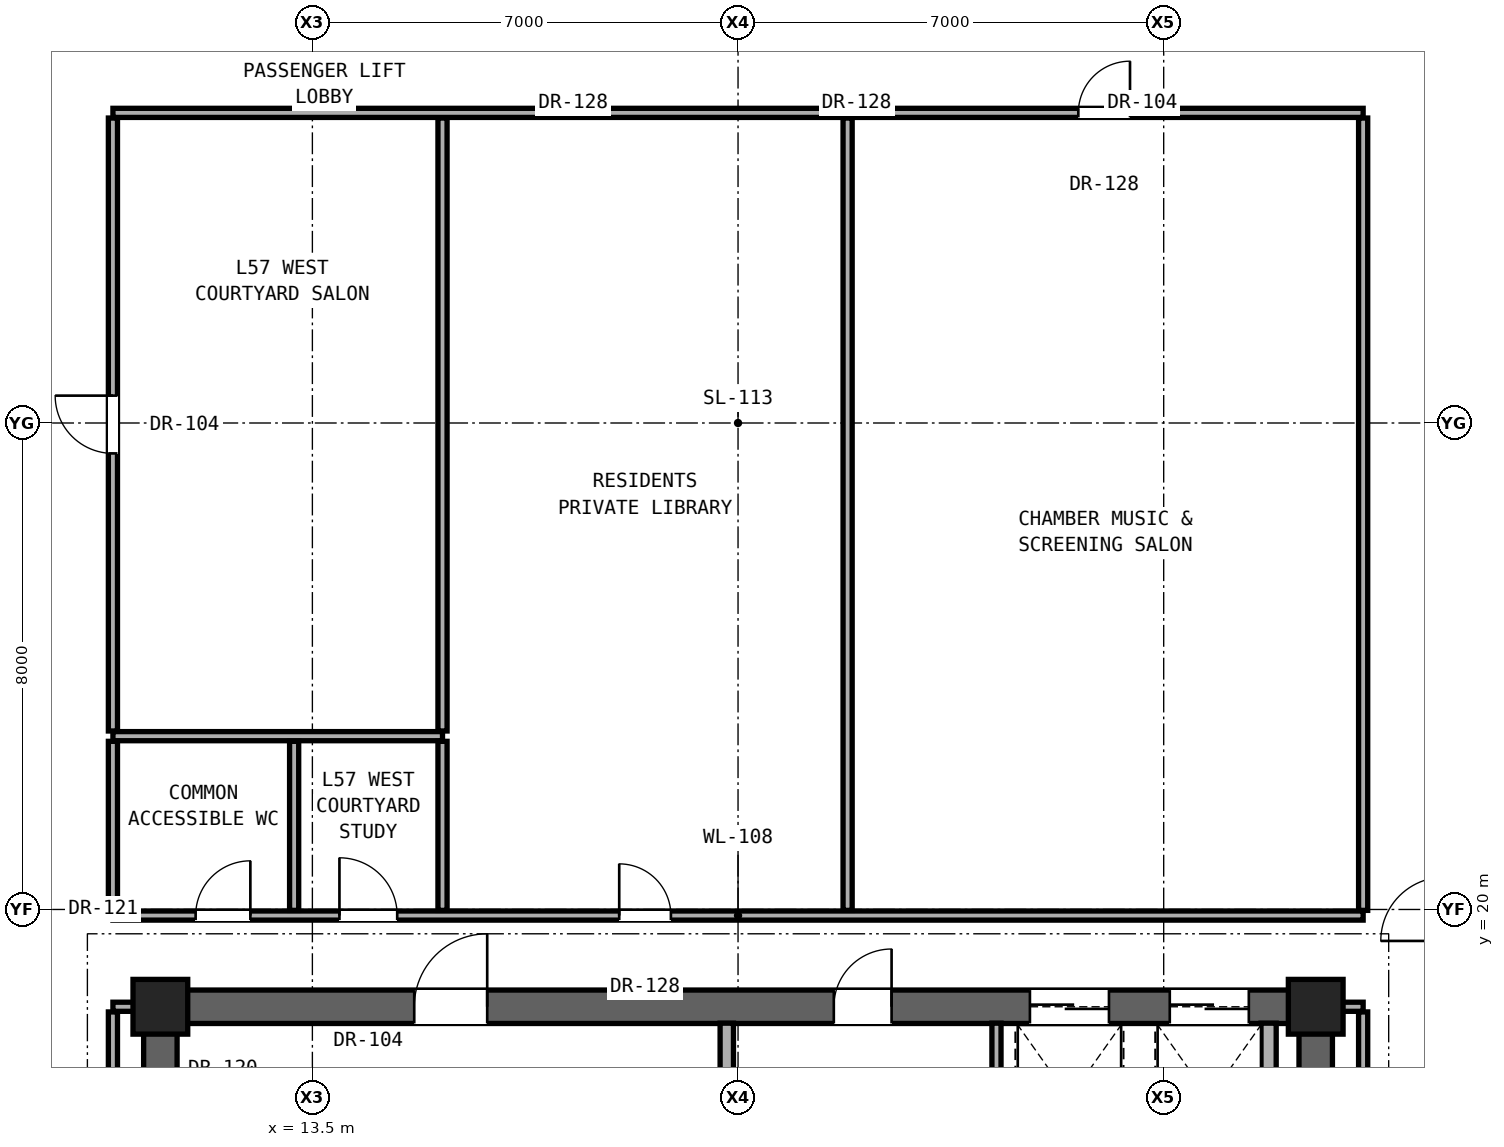
"""IFC4 building model, lengths in metres.
Left out: names, types, materials, properties, quantities, classifications, styles, units other than length and angle.
Written with IfcOpenShell. Run it as: python <this file> out.ifc"""

import sys

from ifc_helpers import new_model, si_unit, direction, frame, frame_2d, origin, origin_2d, place, context, subcontext, project, spatial, rectangle, extrude, element, fill, save


model = new_model("IFC4")
c1 = context("Model", 3, precision=1e-05, world=origin(), true_north=direction((0.0, 1.0)))
c2 = subcontext(c1, "Body", "Model", "MODEL_VIEW")
j1 = project(units=[si_unit("LENGTHUNIT", "METRE"), si_unit("PLANEANGLEUNIT", "RADIAN")], contexts=[c1])
p1 = place(None, origin())
s1 = spatial("IfcSite", under=j1, at=p1, CompositionType="ELEMENT")
p2 = place(p1, origin())
s2 = spatial("IfcBuilding", under=s1, at=p2, CompositionType="ELEMENT")
p3 = place(p2, frame((0.0, 0.0, 199.9)))
s3 = spatial("IfcBuildingStorey", under=s2, at=p3, CompositionType="ELEMENT", Elevation=199.9)
for number, where, z_axis, x_axis in (
    (1, (11.0, 18.4, 0.0), (0.0, 0.0, 1.0), (1.0, 0.0, 0.0)),
    (2, (30.0, 18.4, 0.0), (0.0, 0.0, 1.0), (1.0, 0.0, 0.0)),
):
    element("IfcColumn", number, at=place(p3, frame(where, z_axis=z_axis, x_axis=x_axis)), inside=s3, PredefinedType="COLUMN", context=c2, shape_type="SweptSolid", body=[
        extrude(rectangle(XDim=0.9, YDim=0.9, at=origin_2d()), origin(), (0.0, 0.0, 1.0), 3.25),
    ])
for number, where, z_axis, x_axis in (
    (3, (11.0, 12.4, 0.0), (0.0, 0.0, 1.0), (0.0, 1.0, 0.0)),
    (4, (30.0, 12.4, 0.0), (0.0, 0.0, 1.0), (0.0, 1.0, 0.0)),
):
    element("IfcWall", number, at=place(p3, frame(where, z_axis=z_axis, x_axis=x_axis)), inside=s3, PredefinedType="SHEAR", context=c2, shape_type="SweptSolid", body=[
        extrude(rectangle(XDim=6.0, YDim=0.55, at=frame_2d((3.0, 0.0))), origin(), (0.0, 0.0, 1.0), 3.05),
    ])
p4 = place(p3, frame((11.0, 18.4, 0.0), z_axis=(0.0, 0.0, 1.0), x_axis=(1.0, 0.0, 0.0)))
e5 = element("IfcWall", 5, at=p4, inside=s3, PredefinedType="SHEAR", context=c2, shape_type="SweptSolid", body=[
    extrude(rectangle(XDim=19.0, YDim=0.55, at=frame_2d((9.5, 0.0))), origin(), (0.0, 0.0, 1.0), 3.05),
])
p5 = place(p4, frame((4.175, 0.0, 0.0)))
e6 = element("IfcOpeningElement", 6, at=p5, cuts=e5, PredefinedType="OPENING", context=c2, shape_type="SweptSolid", body=[
    extrude(rectangle(XDim=1.2, YDim=2.25, at=frame_2d((0.6, 1.125))), frame((0.0, 0.285, 0.0), z_axis=(0.0, -1.0, 0.0), x_axis=(1.0, 0.0, 0.0)), (0.0, 0.0, 1.0), 0.57),
])
p6 = place(p4, frame((11.075, 0.0, 0.0)))
e7 = element("IfcOpeningElement", 7, at=p6, cuts=e5, PredefinedType="OPENING", context=c2, shape_type="SweptSolid", body=[
    extrude(rectangle(XDim=0.95, YDim=2.15, at=frame_2d((0.475, 1.075))), frame((0.0, 0.285, 0.0), z_axis=(0.0, -1.0, 0.0), x_axis=(1.0, 0.0, 0.0)), (0.0, 0.0, 1.0), 0.57),
])
p7 = place(p4, frame((14.3, 0.0, 0.0)))
e8 = element("IfcOpeningElement", 8, at=p7, cuts=e5, PredefinedType="OPENING", context=c2, shape_type="SweptSolid", body=[
    extrude(rectangle(XDim=1.3, YDim=2.3, at=frame_2d((0.65, 1.15))), frame((0.0, 0.285, 0.0), z_axis=(0.0, -1.0, 0.0), x_axis=(1.0, 0.0, 0.0)), (0.0, 0.0, 1.0), 0.57),
])
p8 = place(p4, frame((16.6, 0.0, 0.0)))
e9 = element("IfcOpeningElement", 9, at=p8, cuts=e5, PredefinedType="OPENING", context=c2, shape_type="SweptSolid", body=[
    extrude(rectangle(XDim=1.3, YDim=2.3, at=frame_2d((0.65, 1.15))), frame((0.0, 0.285, 0.0), z_axis=(0.0, -1.0, 0.0), x_axis=(1.0, 0.0, 0.0)), (0.0, 0.0, 1.0), 0.57),
])
for number, where, z_axis, x_axis in (
    (10, (10.22, 18.4, 0.0), (0.0, 0.0, 1.0), (1.0, 0.0, 0.0)),
    (11, (30.27, 18.4, 0.0), (0.0, 0.0, 1.0), (1.0, 0.0, 0.0)),
):
    element("IfcWall", number, at=place(p3, frame(where, z_axis=z_axis, x_axis=x_axis)), inside=s3, PredefinedType="PARTITIONING", context=c2, shape_type="SweptSolid", body=[
        extrude(rectangle(XDim=0.51, YDim=0.15, at=frame_2d((0.255, 0.0))), origin(), (0.0, 0.0, 1.0), 2.442),
    ])
p9 = place(p3, frame((10.22, 19.9, 0.0), z_axis=(0.0, 0.0, 1.0), x_axis=(1.0, 0.0, 0.0)))
e12 = element("IfcWall", 12, at=p9, inside=s3, PredefinedType="PARTITIONING", context=c2, shape_type="SweptSolid", body=[
    extrude(rectangle(XDim=20.56, YDim=0.15, at=frame_2d((10.28, 0.0))), origin(), (0.0, 0.0, 1.0), 2.186),
])
p10 = place(p9, frame((1.36, 0.0, 0.0)))
e13 = element("IfcOpeningElement", 13, at=p10, cuts=e12, PredefinedType="OPENING", context=c2, shape_type="SweptSolid", body=[
    extrude(rectangle(XDim=0.9, YDim=2.1, at=frame_2d((0.45, 1.05))), frame((0.0, 0.085, 0.0), z_axis=(0.0, -1.0, 0.0), x_axis=(1.0, 0.0, 0.0)), (0.0, 0.0, 1.0), 0.17),
])
p11 = place(p9, frame((3.725, 0.0, 0.0)))
e14 = element("IfcOpeningElement", 14, at=p11, cuts=e12, PredefinedType="OPENING", context=c2, shape_type="SweptSolid", body=[
    extrude(rectangle(XDim=0.95, YDim=2.15, at=frame_2d((0.475, 1.075))), frame((0.0, 0.085, 0.0), z_axis=(0.0, -1.0, 0.0), x_axis=(1.0, 0.0, 0.0)), (0.0, 0.0, 1.0), 0.17),
])
p12 = place(p9, frame((8.326, 0.0, 0.0)))
e15 = element("IfcOpeningElement", 15, at=p12, cuts=e12, PredefinedType="OPENING", context=c2, shape_type="SweptSolid", body=[
    extrude(rectangle(XDim=0.85, YDim=2.01, at=frame_2d((0.425, 1.005))), frame((0.0, 0.085, 0.0), z_axis=(0.0, -1.0, 0.0), x_axis=(1.0, 0.0, 0.0)), (0.0, 0.0, 1.0), 0.17),
])
p13 = place(p3, frame((10.22, 22.85, 0.0), z_axis=(0.0, 0.0, 1.0), x_axis=(1.0, 0.0, 0.0)))
e16 = element("IfcWall", 16, at=p13, inside=s3, PredefinedType="PARTITIONING", context=c2, shape_type="SweptSolid", body=[
    extrude(rectangle(XDim=5.42, YDim=0.15, at=frame_2d((2.71, 0.0))), origin(), (0.0, 0.0, 1.0), 2.186),
])
p14 = place(p3, frame((10.22, 33.1, 0.0), z_axis=(0.0, 0.0, 1.0), x_axis=(1.0, 0.0, 0.0)))
e17 = element("IfcWall", 17, at=p14, inside=s3, PredefinedType="PARTITIONING", context=c2, shape_type="SweptSolid", body=[
    extrude(rectangle(XDim=20.56, YDim=0.15, at=frame_2d((10.28, 0.0))), origin(), (0.0, 0.0, 1.0), 2.186),
])
p15 = place(p14, frame((15.876, 0.0, 0.0)))
e18 = element("IfcOpeningElement", 18, at=p15, cuts=e17, PredefinedType="OPENING", context=c2, shape_type="SweptSolid", body=[
    extrude(rectangle(XDim=0.85, YDim=2.01, at=frame_2d((0.425, 1.005))), frame((0.0, 0.085, 0.0), z_axis=(0.0, -1.0, 0.0), x_axis=(1.0, 0.0, 0.0)), (0.0, 0.0, 1.0), 0.17),
])
p16 = place(p3, frame((10.22, 12.335, 0.0), z_axis=(0.0, 0.0, 1.0), x_axis=(0.0, 1.0, 0.0)))
e19 = element("IfcWall", 19, at=p16, inside=s3, PredefinedType="PARTITIONING", context=c2, shape_type="SweptSolid", body=[
    extrude(rectangle(XDim=5.98, YDim=0.15, at=frame_2d((2.99, 0.0))), origin(), (0.0, 0.0, 1.0), 2.442),
])
p17 = place(p3, frame((10.22, 19.985, 0.0), z_axis=(0.0, 0.0, 1.0), x_axis=(0.0, 1.0, 0.0)))
e20 = element("IfcWall", 20, at=p17, inside=s3, PredefinedType="PARTITIONING", context=c2, shape_type="SweptSolid", body=[
    extrude(rectangle(XDim=2.78, YDim=0.15, at=frame_2d((1.39, 0.0))), origin(), (0.0, 0.0, 1.0), 3.05),
])
p18 = place(p3, frame((10.22, 22.935, 0.0), z_axis=(0.0, 0.0, 1.0), x_axis=(0.0, 1.0, 0.0)))
e21 = element("IfcWall", 21, at=p18, inside=s3, PredefinedType="PARTITIONING", context=c2, shape_type="SweptSolid", body=[
    extrude(rectangle(XDim=10.08, YDim=0.15, at=frame_2d((5.04, 0.0))), origin(), (0.0, 0.0, 1.0), 2.346),
])
p19 = place(p18, frame((4.565, 0.0, 0.0)))
e22 = element("IfcOpeningElement", 22, at=p19, cuts=e21, PredefinedType="OPENING", context=c2, shape_type="SweptSolid", body=[
    extrude(rectangle(XDim=0.95, YDim=2.15, at=frame_2d((0.475, 1.075))), frame((0.0, 0.085, 0.0), z_axis=(0.0, -1.0, 0.0), x_axis=(1.0, 0.0, 0.0)), (0.0, 0.0, 1.0), 0.17),
])
p20 = place(p3, frame((13.2, 19.985, 0.0), z_axis=(0.0, 0.0, 1.0), x_axis=(0.0, 1.0, 0.0)))
e23 = element("IfcWall", 23, at=p20, inside=s3, PredefinedType="PARTITIONING", context=c2, shape_type="SweptSolid", body=[
    extrude(rectangle(XDim=2.78, YDim=0.15, at=frame_2d((1.39, 0.0))), origin(), (0.0, 0.0, 1.0), 3.05),
])
p21 = place(p3, frame((15.64, 19.985, 0.0), z_axis=(0.0, 0.0, 1.0), x_axis=(0.0, 1.0, 0.0)))
e24 = element("IfcWall", 24, at=p21, inside=s3, PredefinedType="PARTITIONING", context=c2, shape_type="SweptSolid", body=[
    extrude(rectangle(XDim=2.78, YDim=0.15, at=frame_2d((1.39, 0.0))), origin(), (0.0, 0.0, 1.0), 2.625),
])
p22 = place(p3, frame((15.64, 22.935, 0.0), z_axis=(0.0, 0.0, 1.0), x_axis=(0.0, 1.0, 0.0)))
e25 = element("IfcWall", 25, at=p22, inside=s3, PredefinedType="PARTITIONING", context=c2, shape_type="SweptSolid", body=[
    extrude(rectangle(XDim=10.08, YDim=0.15, at=frame_2d((5.04, 0.0))), origin(), (0.0, 0.0, 1.0), 2.186),
])
p23 = place(p3, frame((20.315, 16.555, 0.0), z_axis=(0.0, 0.0, 1.0), x_axis=(0.0, 1.0, 0.0)))
e26 = element("IfcWall", 26, at=p23, inside=s3, PredefinedType="SOLIDWALL", context=c2, shape_type="SweptSolid", body=[
    extrude(rectangle(XDim=1.575, YDim=0.22, at=frame_2d((0.788, 0.0))), origin(), (0.0, 0.0, 1.0), 3.05),
])
p24 = place(p3, frame((22.302, 19.985, 0.0), z_axis=(0.0, 0.0, 1.0), x_axis=(0.0, 1.0, 0.0)))
e27 = element("IfcWall", 27, at=p24, inside=s3, PredefinedType="PARTITIONING", context=c2, shape_type="SweptSolid", body=[
    extrude(rectangle(XDim=13.03, YDim=0.15, at=frame_2d((6.515, 0.0))), origin(), (0.0, 0.0, 1.0), 2.186),
])
p25 = place(p3, frame((24.75, 15.573, 0.0), z_axis=(0.0, 0.0, 1.0), x_axis=(0.0, 1.0, 0.0)))
e28 = element("IfcWall", 28, at=p25, inside=s3, PredefinedType="PARTITIONING", context=c2, shape_type="SweptSolid", body=[
    extrude(rectangle(XDim=2.557, YDim=0.15, at=frame_2d((1.279, 0.0))), origin(), (0.0, 0.0, 1.0), 3.05),
])
p26 = place(p3, frame((29.225, 15.573, 0.0), z_axis=(0.0, 0.0, 1.0), x_axis=(0.0, 1.0, 0.0)))
e29 = element("IfcWall", 29, at=p26, inside=s3, PredefinedType="SOLIDWALL", context=c2, shape_type="SweptSolid", body=[
    extrude(rectangle(XDim=2.557, YDim=0.25, at=frame_2d((1.279, 0.0))), origin(), (0.0, 0.0, 1.0), 3.05),
])
p27 = place(p3, frame((30.78, 12.335, 0.0), z_axis=(0.0, 0.0, 1.0), x_axis=(0.0, 1.0, 0.0)))
e30 = element("IfcWall", 30, at=p27, inside=s3, PredefinedType="PARTITIONING", context=c2, shape_type="SweptSolid", body=[
    extrude(rectangle(XDim=5.98, YDim=0.15, at=frame_2d((2.99, 0.0))), origin(), (0.0, 0.0, 1.0), 2.442),
])
p28 = place(p3, frame((30.78, 19.985, 0.0), z_axis=(0.0, 0.0, 1.0), x_axis=(0.0, 1.0, 0.0)))
e31 = element("IfcWall", 31, at=p28, inside=s3, PredefinedType="PARTITIONING", context=c2, shape_type="SweptSolid", body=[
    extrude(rectangle(XDim=13.03, YDim=0.15, at=frame_2d((6.515, 0.0))), origin(), (0.0, 0.0, 1.0), 2.346),
])
p29 = place(p5, origin())
e32 = element("IfcDoor", 32, at=p29, inside=s3, OperationType="SINGLE_SWING_RIGHT", PredefinedType="DOOR", context=c2, shape_type="SweptSolid", body=[
    extrude(rectangle(XDim=1.2, YDim=2.25, at=frame_2d((0.6, 1.125))), frame((0.0, 0.025, 0.0), z_axis=(0.0, -1.0, 0.0), x_axis=(1.0, 0.0, 0.0)), (0.0, 0.0, 1.0), 0.05),
])
fill(e6, e32)
p30 = place(p6, origin())
e33 = element("IfcDoor", 33, at=p30, inside=s3, OperationType="SINGLE_SWING_RIGHT", PredefinedType="DOOR", context=c2, shape_type="SweptSolid", body=[
    extrude(rectangle(XDim=0.95, YDim=2.15, at=frame_2d((0.475, 1.075))), frame((0.0, 0.025, 0.0), z_axis=(0.0, -1.0, 0.0), x_axis=(1.0, 0.0, 0.0)), (0.0, 0.0, 1.0), 0.05),
])
fill(e7, e33)
p31 = place(p10, origin())
e34 = element("IfcDoor", 34, at=p31, inside=s3, OperationType="SINGLE_SWING_RIGHT", PredefinedType="DOOR", context=c2, shape_type="SweptSolid", body=[
    extrude(rectangle(XDim=0.9, YDim=2.1, at=frame_2d((0.45, 1.05))), frame((0.0, 0.025, 0.0), z_axis=(0.0, -1.0, 0.0), x_axis=(1.0, 0.0, 0.0)), (0.0, 0.0, 1.0), 0.05),
])
fill(e13, e34)
p32 = place(p11, origin())
e35 = element("IfcDoor", 35, at=p32, inside=s3, OperationType="SINGLE_SWING_LEFT", PredefinedType="DOOR", context=c2, shape_type="SweptSolid", body=[
    extrude(rectangle(XDim=0.95, YDim=2.15, at=frame_2d((0.475, 1.075))), frame((0.0, 0.025, 0.0), z_axis=(0.0, -1.0, 0.0), x_axis=(1.0, 0.0, 0.0)), (0.0, 0.0, 1.0), 0.05),
])
fill(e14, e35)
p33 = place(p19, origin())
e36 = element("IfcDoor", 36, at=p33, inside=s3, OperationType="SINGLE_SWING_RIGHT", PredefinedType="DOOR", context=c2, shape_type="SweptSolid", body=[
    extrude(rectangle(XDim=0.95, YDim=2.15, at=frame_2d((0.475, 1.075))), frame((0.0, 0.025, 0.0), z_axis=(0.0, -1.0, 0.0), x_axis=(1.0, 0.0, 0.0)), (0.0, 0.0, 1.0), 0.05),
])
fill(e22, e36)
p34 = place(p12, origin())
e37 = element("IfcDoor", 37, at=p34, inside=s3, OperationType="SINGLE_SWING_LEFT", PredefinedType="DOOR", context=c2, shape_type="SweptSolid", body=[
    extrude(rectangle(XDim=0.85, YDim=2.01, at=frame_2d((0.425, 1.005))), frame((0.0, 0.025, 0.0), z_axis=(0.0, -1.0, 0.0), x_axis=(1.0, 0.0, 0.0)), (0.0, 0.0, 1.0), 0.05),
])
fill(e15, e37)
p35 = place(p15, origin())
e38 = element("IfcDoor", 38, at=p35, inside=s3, OperationType="SINGLE_SWING_RIGHT", PredefinedType="DOOR", context=c2, shape_type="SweptSolid", body=[
    extrude(rectangle(XDim=0.85, YDim=2.01, at=frame_2d((0.425, 1.005))), frame((0.0, 0.025, 0.0), z_axis=(0.0, -1.0, 0.0), x_axis=(1.0, 0.0, 0.0)), (0.0, 0.0, 1.0), 0.05),
])
fill(e18, e38)
p36 = place(p7, origin())
e39 = element("IfcDoor", 39, at=p36, inside=s3, OperationType="DOUBLE_DOOR_SLIDING", PredefinedType="DOOR", context=c2, shape_type="SweptSolid", body=[
    extrude(rectangle(XDim=1.3, YDim=2.3, at=frame_2d((0.65, 1.15))), frame((0.0, 0.025, 0.0), z_axis=(0.0, -1.0, 0.0), x_axis=(1.0, 0.0, 0.0)), (0.0, 0.0, 1.0), 0.05),
])
fill(e8, e39)
p37 = place(p8, origin())
e40 = element("IfcDoor", 40, at=p37, inside=s3, OperationType="DOUBLE_DOOR_SLIDING", PredefinedType="DOOR", context=c2, shape_type="SweptSolid", body=[
    extrude(rectangle(XDim=1.3, YDim=2.3, at=frame_2d((0.65, 1.15))), frame((0.0, 0.025, 0.0), z_axis=(0.0, -1.0, 0.0), x_axis=(1.0, 0.0, 0.0)), (0.0, 0.0, 1.0), 0.05),
])
fill(e9, e40)
save(model, sys.argv[1])
